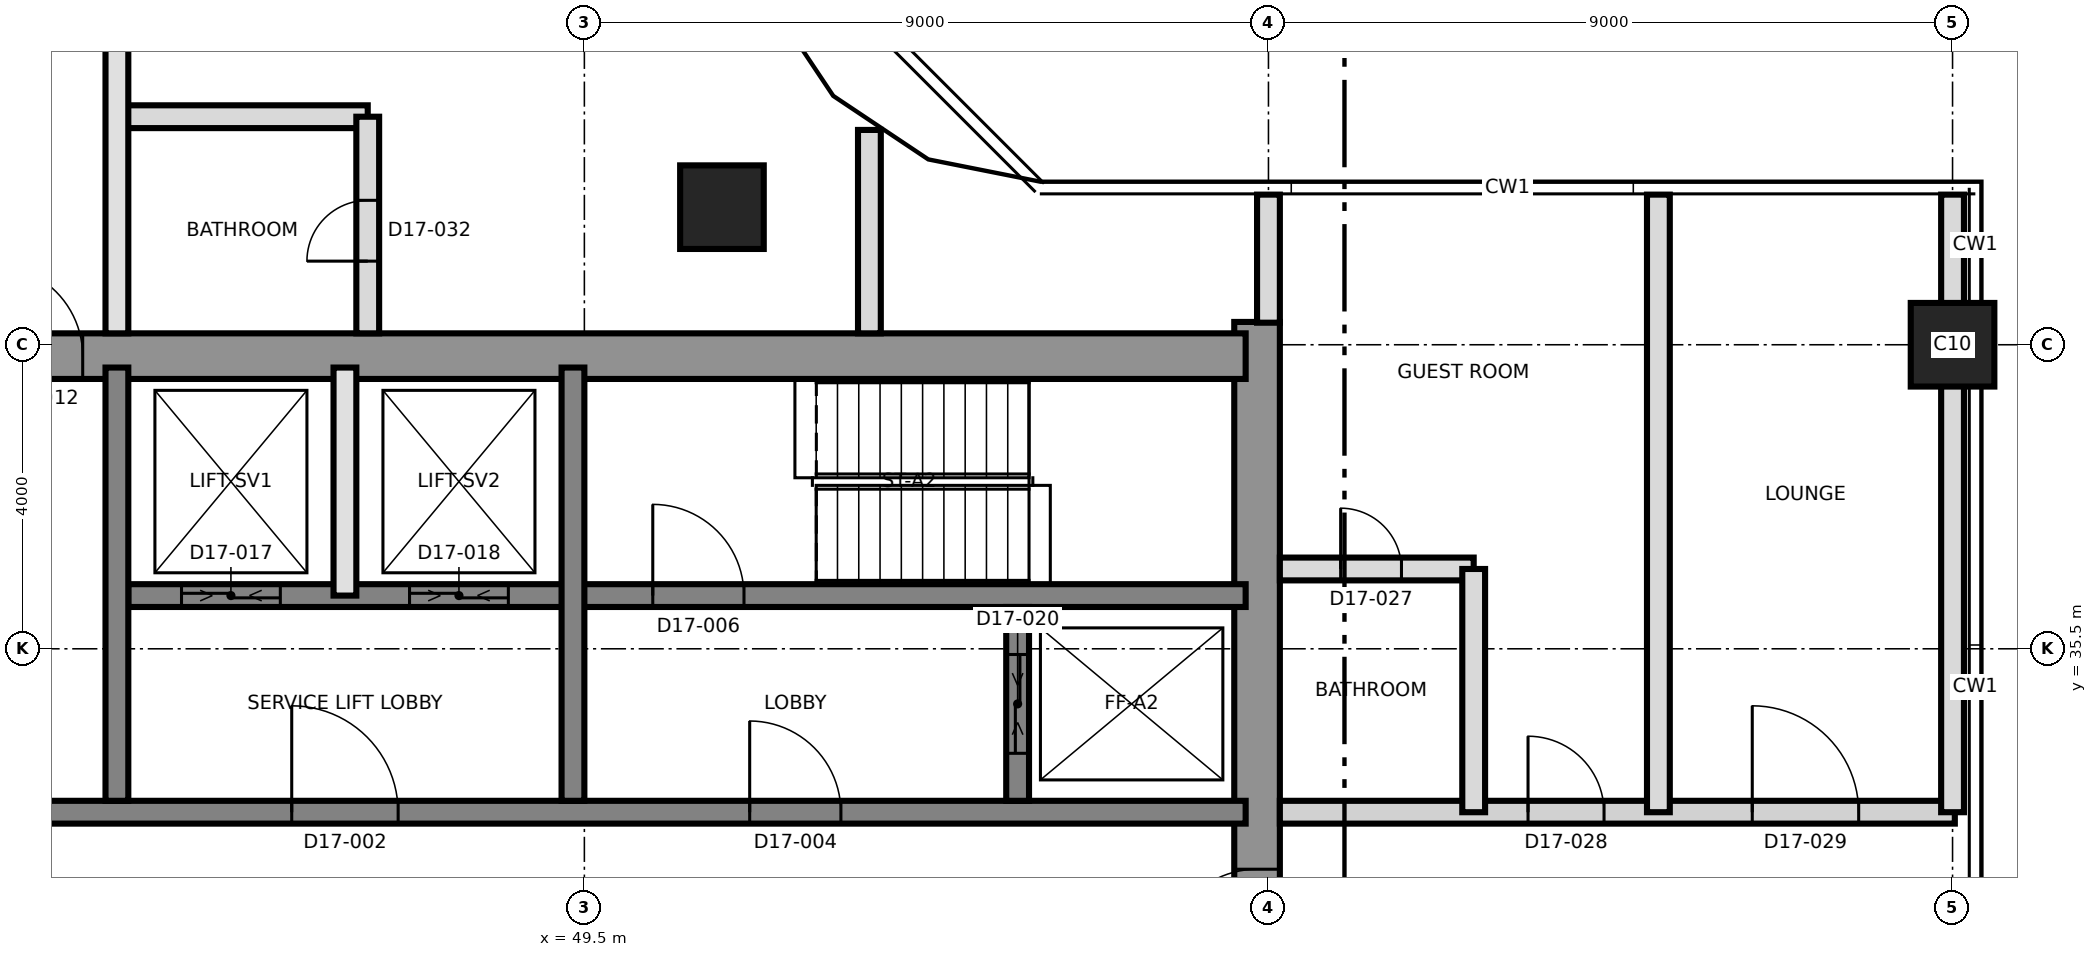
"""IFC4 building model, lengths in metres.
Left out: names, types, materials, properties, quantities, classifications, styles, units other than length and angle.
Written with IfcOpenShell. Run it as: python <this file> out.ifc"""

import sys

from ifc_helpers import new_model, si_unit, direction, frame, frame_2d, origin, origin_2d, place, context, subcontext, project, spatial, rectangle, extrude, element, fill, save


model = new_model("IFC4")
c1 = context("Model", 3, precision=1e-05, world=origin(), true_north=direction((0.0, 1.0)))
c2 = subcontext(c1, "Body", "Model", "MODEL_VIEW")
j1 = project(units=[si_unit("LENGTHUNIT", "METRE"), si_unit("PLANEANGLEUNIT", "RADIAN")], contexts=[c1])
p1 = place(None, origin())
s1 = spatial("IfcSite", under=j1, at=p1, CompositionType="ELEMENT")
p2 = place(p1, origin())
s2 = spatial("IfcBuilding", under=s1, at=p2, CompositionType="ELEMENT")
p3 = place(p2, frame((0.0, 0.0, 171.8)))
s3 = spatial("IfcBuildingStorey", under=s2, at=p3, CompositionType="ELEMENT", Elevation=171.8)
p4 = place(p3, frame((58.35, 21.2, 0.0), z_axis=(0.0, 0.0, 1.0), x_axis=(0.0, 1.0, 0.0)))
e1 = element("IfcWall", 1, at=p4, inside=s3, PredefinedType="SHEAR", context=c2, shape_type="SweptSolid", body=[
    extrude(rectangle(XDim=18.6, YDim=0.6, at=frame_2d((9.3, 0.0))), origin(), (0.0, 0.0, 1.0), 3.7),
])
p5 = place(p4, frame((10.2, 0.0, 0.0)))
e2 = element("IfcOpeningElement", 2, at=p5, cuts=e1, PredefinedType="OPENING", context=c2, shape_type="SweptSolid", body=[
    extrude(rectangle(XDim=1.2, YDim=2.1, at=frame_2d((0.6, 1.05))), frame((0.0, 0.31, 0.0), z_axis=(0.0, -1.0, 0.0), x_axis=(1.0, 0.0, 0.0)), (0.0, 0.0, 1.0), 0.62),
])
p6 = place(p3, frame((31.2, 39.35, 0.0), z_axis=(0.0, 0.0, 1.0), x_axis=(1.0, 0.0, 0.0)))
e3 = element("IfcWall", 3, at=p6, inside=s3, PredefinedType="SHEAR", context=c2, shape_type="SweptSolid", body=[
    extrude(rectangle(XDim=27.0, YDim=0.6, at=frame_2d((13.5, 0.0))), origin(), (0.0, 0.0, 1.0), 3.7),
])
p7 = place(p6, frame((10.5, 0.0, 0.0)))
e4 = element("IfcOpeningElement", 4, at=p7, cuts=e3, PredefinedType="OPENING", context=c2, shape_type="SweptSolid", body=[
    extrude(rectangle(XDim=1.2, YDim=2.1, at=frame_2d((0.6, 1.05))), frame((0.0, 0.31, 0.0), z_axis=(0.0, -1.0, 0.0), x_axis=(1.0, 0.0, 0.0)), (0.0, 0.0, 1.0), 0.62),
])
p8 = place(p3, frame((31.8, 33.35, 0.0), z_axis=(0.0, 0.0, 1.0), x_axis=(1.0, 0.0, 0.0)))
e5 = element("IfcWall", 5, at=p8, inside=s3, PredefinedType="SHEAR", context=c2, shape_type="SweptSolid", body=[
    extrude(rectangle(XDim=26.4, YDim=0.3, at=frame_2d((13.2, 0.0))), origin(), (0.0, 0.0, 1.0), 3.7),
])
p9 = place(p8, frame((13.85, 0.0, 0.0)))
e6 = element("IfcOpeningElement", 6, at=p9, cuts=e5, PredefinedType="OPENING", context=c2, shape_type="SweptSolid", body=[
    extrude(rectangle(XDim=1.4, YDim=2.1, at=frame_2d((0.7, 1.05))), frame((0.0, 0.16, 0.0), z_axis=(0.0, -1.0, 0.0), x_axis=(1.0, 0.0, 0.0)), (0.0, 0.0, 1.0), 0.32),
])
p10 = place(p8, frame((5.325, 0.0, 0.0)))
e7 = element("IfcOpeningElement", 7, at=p10, cuts=e5, PredefinedType="OPENING", context=c2, shape_type="SweptSolid", body=[
    extrude(rectangle(XDim=1.2, YDim=2.1, at=frame_2d((0.6, 1.05))), frame((0.0, 0.16, 0.0), z_axis=(0.0, -1.0, 0.0), x_axis=(1.0, 0.0, 0.0)), (0.0, 0.0, 1.0), 0.32),
])
p11 = place(p8, frame((19.875, 0.0, 0.0)))
e8 = element("IfcOpeningElement", 8, at=p11, cuts=e5, PredefinedType="OPENING", context=c2, shape_type="SweptSolid", body=[
    extrude(rectangle(XDim=1.2, YDim=2.1, at=frame_2d((0.6, 1.05))), frame((0.0, 0.16, 0.0), z_axis=(0.0, -1.0, 0.0), x_axis=(1.0, 0.0, 0.0)), (0.0, 0.0, 1.0), 0.32),
])
p12 = place(p3, frame((43.5, 36.2, 0.0), z_axis=(0.0, 0.0, 1.0), x_axis=(1.0, 0.0, 0.0)))
e9 = element("IfcWall", 9, at=p12, inside=s3, PredefinedType="SHEAR", context=c2, shape_type="SweptSolid", body=[
    extrude(rectangle(XDim=14.7, YDim=0.3, at=frame_2d((7.35, 0.0))), origin(), (0.0, 0.0, 1.0), 3.7),
])
p13 = place(p12, frame((6.9, 0.0, 0.0)))
e10 = element("IfcOpeningElement", 10, at=p13, cuts=e9, PredefinedType="OPENING", context=c2, shape_type="SweptSolid", body=[
    extrude(rectangle(XDim=1.2, YDim=2.1, at=frame_2d((0.6, 1.05))), frame((0.0, 0.16, 0.0), z_axis=(0.0, -1.0, 0.0), x_axis=(1.0, 0.0, 0.0)), (0.0, 0.0, 1.0), 0.32),
])
p14 = place(p12, frame((0.7, 0.0, 0.0)))
e11 = element("IfcOpeningElement", 11, at=p14, cuts=e9, PredefinedType="OPENING", context=c2, shape_type="SweptSolid", body=[
    extrude(rectangle(XDim=1.3, YDim=2.4, at=frame_2d((0.65, 1.2))), frame((0.0, 0.16, 0.0), z_axis=(0.0, -1.0, 0.0), x_axis=(1.0, 0.0, 0.0)), (0.0, 0.0, 1.0), 0.32),
])
p15 = place(p12, frame((3.7, 0.0, 0.0)))
e12 = element("IfcOpeningElement", 12, at=p15, cuts=e9, PredefinedType="OPENING", context=c2, shape_type="SweptSolid", body=[
    extrude(rectangle(XDim=1.3, YDim=2.4, at=frame_2d((0.65, 1.2))), frame((0.0, 0.16, 0.0), z_axis=(0.0, -1.0, 0.0), x_axis=(1.0, 0.0, 0.0)), (0.0, 0.0, 1.0), 0.32),
])
for number, where, z_axis, x_axis in (
    (13, (43.35, 33.5, 0.0), (0.0, 0.0, 1.0), (0.0, 1.0, 0.0)),
    (14, (49.35, 33.5, 0.0), (0.0, 0.0, 1.0), (0.0, 1.0, 0.0)),
):
    element("IfcWall", number, at=place(p3, frame(where, z_axis=z_axis, x_axis=x_axis)), inside=s3, PredefinedType="SHEAR", context=c2, shape_type="SweptSolid", body=[
        extrude(rectangle(XDim=5.7, YDim=0.3, at=frame_2d((2.85, 0.0))), origin(), (0.0, 0.0, 1.0), 3.7),
    ])
p16 = place(p3, frame((55.2, 33.5, 0.0), z_axis=(0.0, 0.0, 1.0), x_axis=(0.0, 1.0, 0.0)))
e15 = element("IfcWall", 15, at=p16, inside=s3, PredefinedType="SHEAR", context=c2, shape_type="SweptSolid", body=[
    extrude(rectangle(XDim=2.55, YDim=0.3, at=frame_2d((1.275, 0.0))), origin(), (0.0, 0.0, 1.0), 3.7),
])
p17 = place(p16, frame((0.625, 0.0, 0.0)))
e16 = element("IfcOpeningElement", 16, at=p17, cuts=e15, PredefinedType="OPENING", context=c2, shape_type="SweptSolid", body=[
    extrude(rectangle(XDim=1.3, YDim=2.4, at=frame_2d((0.65, 1.2))), frame((0.0, 0.16, 0.0), z_axis=(0.0, -1.0, 0.0), x_axis=(1.0, 0.0, 0.0)), (0.0, 0.0, 1.0), 0.32),
])
for number, where, z_axis, x_axis in (
    (17, (67.5, 39.5, 0.0), (0.0, 0.0, 1.0), (1.0, 0.0, 0.0)),
    (18, (51.31, 41.31, 0.0), (0.0, 0.0, 1.0), (1.0, 0.0, 0.0)),
):
    element("IfcColumn", number, at=place(p3, frame(where, z_axis=z_axis, x_axis=x_axis)), inside=s3, PredefinedType="COLUMN", context=c2, shape_type="SweptSolid", body=[
        extrude(rectangle(XDim=1.1, YDim=1.1, at=origin_2d()), origin(), (0.0, 0.0, 1.0), 3.7),
    ])
p18 = place(p3, frame((46.35, 36.2, 0.0), z_axis=(0.0, 0.0, 1.0), x_axis=(0.0, 1.0, 0.0)))
e19 = element("IfcWall", 19, at=p18, inside=s3, PredefinedType="SOLIDWALL", context=c2, shape_type="SweptSolid", body=[
    extrude(rectangle(XDim=3.0, YDim=0.3, at=frame_2d((1.5, 0.0))), origin(), (0.0, 0.0, 1.0), 3.4),
])
p19 = place(p3, frame((58.65, 33.35, 0.0), z_axis=(0.0, 0.0, 1.0), x_axis=(1.0, 0.0, 0.0)))
e20 = element("IfcWall", 20, at=p19, inside=s3, PredefinedType="PARTITIONING", context=c2, shape_type="SweptSolid", body=[
    extrude(rectangle(XDim=8.88, YDim=0.3, at=frame_2d((4.44, 0.0))), origin(), (0.0, 0.0, 1.0), 3.4),
])
p20 = place(p19, frame((3.265, 0.0, 0.0)))
e21 = element("IfcOpeningElement", 21, at=p20, cuts=e20, PredefinedType="OPENING", context=c2, shape_type="SweptSolid", body=[
    extrude(rectangle(XDim=1.0, YDim=2.1, at=frame_2d((0.5, 1.05))), frame((0.0, 0.16, 0.0), z_axis=(0.0, -1.0, 0.0), x_axis=(1.0, 0.0, 0.0)), (0.0, 0.0, 1.0), 0.32),
])
p21 = place(p19, frame((6.215, 0.0, 0.0)))
e22 = element("IfcOpeningElement", 22, at=p21, cuts=e20, PredefinedType="OPENING", context=c2, shape_type="SweptSolid", body=[
    extrude(rectangle(XDim=1.4, YDim=2.1, at=frame_2d((0.7, 1.05))), frame((0.0, 0.16, 0.0), z_axis=(0.0, -1.0, 0.0), x_axis=(1.0, 0.0, 0.0)), (0.0, 0.0, 1.0), 0.32),
])
p22 = place(p3, frame((58.65, 36.55, 0.0), z_axis=(0.0, 0.0, 1.0), x_axis=(1.0, 0.0, 0.0)))
e23 = element("IfcWall", 23, at=p22, inside=s3, PredefinedType="PARTITIONING", context=c2, shape_type="SweptSolid", body=[
    extrude(rectangle(XDim=2.55, YDim=0.3, at=frame_2d((1.275, 0.0))), origin(), (0.0, 0.0, 1.0), 3.4),
])
p23 = place(p22, frame((0.8, 0.0, 0.0)))
e24 = element("IfcOpeningElement", 24, at=p23, cuts=e23, PredefinedType="OPENING", context=c2, shape_type="SweptSolid", body=[
    extrude(rectangle(XDim=0.8, YDim=2.1, at=frame_2d((0.4, 1.05))), frame((0.0, 0.16, 0.0), z_axis=(0.0, -1.0, 0.0), x_axis=(1.0, 0.0, 0.0)), (0.0, 0.0, 1.0), 0.32),
])
p24 = place(p3, frame((43.35, 42.5, 0.0), z_axis=(0.0, 0.0, 1.0), x_axis=(1.0, 0.0, 0.0)))
e25 = element("IfcWall", 25, at=p24, inside=s3, PredefinedType="PARTITIONING", context=c2, shape_type="SweptSolid", body=[
    extrude(rectangle(XDim=3.3, YDim=0.3, at=frame_2d((1.65, 0.0))), origin(), (0.0, 0.0, 1.0), 3.4),
])
p25 = place(p3, frame((43.35, 39.65, 0.0), z_axis=(0.0, 0.0, 1.0), x_axis=(0.0, 1.0, 0.0)))
e26 = element("IfcWall", 26, at=p25, inside=s3, PredefinedType="SOLIDWALL", context=c2, shape_type="SweptSolid", body=[
    extrude(rectangle(XDim=26.15, YDim=0.3, at=frame_2d((13.075, 0.0))), origin(), (0.0, 0.0, 1.0), 3.4),
])
p26 = place(p25, frame((3.85, 0.0, 0.0)))
e27 = element("IfcOpeningElement", 27, at=p26, cuts=e26, PredefinedType="OPENING", context=c2, shape_type="SweptSolid", body=[
    extrude(rectangle(XDim=1.0, YDim=2.4, at=frame_2d((0.5, 1.2))), frame((0.0, 0.16, 0.0), z_axis=(0.0, -1.0, 0.0), x_axis=(1.0, 0.0, 0.0)), (0.0, 0.0, 1.0), 0.32),
])
p27 = place(p25, frame((12.265, 0.0, 0.0)))
e28 = element("IfcOpeningElement", 28, at=p27, cuts=e26, PredefinedType="OPENING", context=c2, shape_type="SweptSolid", body=[
    extrude(rectangle(XDim=1.0, YDim=2.1, at=frame_2d((0.5, 1.05))), frame((0.0, 0.16, 0.0), z_axis=(0.0, -1.0, 0.0), x_axis=(1.0, 0.0, 0.0)), (0.0, 0.0, 1.0), 0.32),
])
p28 = place(p25, frame((15.215, 0.0, 0.0)))
e29 = element("IfcOpeningElement", 29, at=p28, cuts=e26, PredefinedType="OPENING", context=c2, shape_type="SweptSolid", body=[
    extrude(rectangle(XDim=1.4, YDim=2.1, at=frame_2d((0.7, 1.05))), frame((0.0, 0.16, 0.0), z_axis=(0.0, -1.0, 0.0), x_axis=(1.0, 0.0, 0.0)), (0.0, 0.0, 1.0), 0.32),
])
p29 = place(p25, frame((21.4, 0.0, 0.0)))
e30 = element("IfcOpeningElement", 30, at=p29, cuts=e26, PredefinedType="OPENING", context=c2, shape_type="SweptSolid", body=[
    extrude(rectangle(XDim=1.0, YDim=2.4, at=frame_2d((0.5, 1.2))), frame((0.0, 0.16, 0.0), z_axis=(0.0, -1.0, 0.0), x_axis=(1.0, 0.0, 0.0)), (0.0, 0.0, 1.0), 0.32),
])
p30 = place(p3, frame((46.65, 39.65, 0.0), z_axis=(0.0, 0.0, 1.0), x_axis=(0.0, 1.0, 0.0)))
e31 = element("IfcWall", 31, at=p30, inside=s3, PredefinedType="PARTITIONING", context=c2, shape_type="SweptSolid", body=[
    extrude(rectangle(XDim=2.85, YDim=0.3, at=frame_2d((1.425, 0.0))), origin(), (0.0, 0.0, 1.0), 3.4),
])
p31 = place(p30, frame((0.95, 0.0, 0.0)))
e32 = element("IfcOpeningElement", 32, at=p31, cuts=e31, PredefinedType="OPENING", context=c2, shape_type="SweptSolid", body=[
    extrude(rectangle(XDim=0.8, YDim=2.1, at=frame_2d((0.4, 1.05))), frame((0.0, 0.16, 0.0), z_axis=(0.0, -1.0, 0.0), x_axis=(1.0, 0.0, 0.0)), (0.0, 0.0, 1.0), 0.32),
])
p32 = place(p3, frame((53.25, 39.65, 0.0), z_axis=(0.0, 0.0, 1.0), x_axis=(0.0, 1.0, 0.0)))
e33 = element("IfcWall", 33, at=p32, inside=s3, PredefinedType="PARTITIONING", context=c2, shape_type="SweptSolid", body=[
    extrude(rectangle(XDim=2.676, YDim=0.3, at=frame_2d((1.338, 0.0))), origin(), (0.0, 0.0, 1.0), 3.4),
])
p33 = place(p3, frame((58.5, 39.79, 0.0), z_axis=(0.0, 0.0, 1.0), x_axis=(0.0, 1.0, 0.0)))
e34 = element("IfcWall", 34, at=p33, inside=s3, PredefinedType="PARTITIONING", context=c2, shape_type="SweptSolid", body=[
    extrude(rectangle(XDim=1.685, YDim=0.3, at=frame_2d((0.843, 0.0))), origin(), (0.0, 0.0, 1.0), 3.4),
])
p34 = place(p3, frame((61.2, 33.35, 0.0), z_axis=(0.0, 0.0, 1.0), x_axis=(0.0, 1.0, 0.0)))
e35 = element("IfcWall", 35, at=p34, inside=s3, PredefinedType="PARTITIONING", context=c2, shape_type="SweptSolid", body=[
    extrude(rectangle(XDim=3.2, YDim=0.3, at=frame_2d((1.6, 0.0))), origin(), (0.0, 0.0, 1.0), 3.4),
])
for number, where, z_axis, x_axis in (
    (36, (63.63, 33.35, 0.0), (0.0, 0.0, 1.0), (0.0, 1.0, 0.0)),
    (37, (67.5, 33.35, 0.0), (0.0, 0.0, 1.0), (0.0, 1.0, 0.0)),
):
    element("IfcWall", number, at=place(p3, frame(where, z_axis=z_axis, x_axis=x_axis)), inside=s3, PredefinedType="PARTITIONING", context=c2, shape_type="SweptSolid", body=[
        extrude(rectangle(XDim=8.125, YDim=0.3, at=frame_2d((4.062, 0.0))), origin(), (0.0, 0.0, 1.0), 3.4),
    ])
p35 = place(p9, origin())
e38 = element("IfcDoor", 38, at=p35, inside=s3, OperationType="SINGLE_SWING_RIGHT", PredefinedType="DOOR", context=c2, shape_type="SweptSolid", body=[
    extrude(rectangle(XDim=1.4, YDim=2.1, at=frame_2d((0.7, 1.05))), frame((0.0, 0.025, 0.0), z_axis=(0.0, -1.0, 0.0), x_axis=(1.0, 0.0, 0.0)), (0.0, 0.0, 1.0), 0.05),
])
fill(e6, e38)
p36 = place(p11, origin())
e39 = element("IfcDoor", 39, at=p36, inside=s3, OperationType="SINGLE_SWING_RIGHT", PredefinedType="DOOR", context=c2, shape_type="SweptSolid", body=[
    extrude(rectangle(XDim=1.2, YDim=2.1, at=frame_2d((0.6, 1.05))), frame((0.0, 0.025, 0.0), z_axis=(0.0, -1.0, 0.0), x_axis=(1.0, 0.0, 0.0)), (0.0, 0.0, 1.0), 0.05),
])
fill(e8, e39)
p37 = place(p13, origin())
e40 = element("IfcDoor", 40, at=p37, inside=s3, OperationType="SINGLE_SWING_LEFT", PredefinedType="DOOR", context=c2, shape_type="SweptSolid", body=[
    extrude(rectangle(XDim=1.2, YDim=2.1, at=frame_2d((0.6, 1.05))), frame((0.0, 0.025, 0.0), z_axis=(0.0, -1.0, 0.0), x_axis=(1.0, 0.0, 0.0)), (0.0, 0.0, 1.0), 0.05),
])
fill(e10, e40)
p38 = place(p5, origin())
e41 = element("IfcDoor", 41, at=p38, inside=s3, OperationType="SINGLE_SWING_LEFT", PredefinedType="DOOR", context=c2, shape_type="SweptSolid", body=[
    extrude(rectangle(XDim=1.2, YDim=2.1, at=frame_2d((0.6, 1.05))), frame((0.0, 0.025, 0.0), z_axis=(0.0, -1.0, 0.0), x_axis=(1.0, 0.0, 0.0)), (0.0, 0.0, 1.0), 0.05),
])
fill(e2, e41)
p39 = place(p7, origin())
e42 = element("IfcDoor", 42, at=p39, inside=s3, OperationType="SINGLE_SWING_RIGHT", PredefinedType="DOOR", context=c2, shape_type="SweptSolid", body=[
    extrude(rectangle(XDim=1.2, YDim=2.1, at=frame_2d((0.6, 1.05))), frame((0.0, 0.025, 0.0), z_axis=(0.0, -1.0, 0.0), x_axis=(1.0, 0.0, 0.0)), (0.0, 0.0, 1.0), 0.05),
])
fill(e4, e42)
p40 = place(p14, origin())
e43 = element("IfcDoor", 43, at=p40, inside=s3, OperationType="SLIDING_TO_LEFT", PredefinedType="DOOR", context=c2, shape_type="SweptSolid", body=[
    extrude(rectangle(XDim=1.3, YDim=2.4, at=frame_2d((0.65, 1.2))), frame((0.0, 0.025, 0.0), z_axis=(0.0, -1.0, 0.0), x_axis=(1.0, 0.0, 0.0)), (0.0, 0.0, 1.0), 0.05),
])
fill(e11, e43)
p41 = place(p15, origin())
e44 = element("IfcDoor", 44, at=p41, inside=s3, OperationType="SLIDING_TO_LEFT", PredefinedType="DOOR", context=c2, shape_type="SweptSolid", body=[
    extrude(rectangle(XDim=1.3, YDim=2.4, at=frame_2d((0.65, 1.2))), frame((0.0, 0.025, 0.0), z_axis=(0.0, -1.0, 0.0), x_axis=(1.0, 0.0, 0.0)), (0.0, 0.0, 1.0), 0.05),
])
fill(e12, e44)
p42 = place(p17, origin())
e45 = element("IfcDoor", 45, at=p42, inside=s3, OperationType="SLIDING_TO_LEFT", PredefinedType="DOOR", context=c2, shape_type="SweptSolid", body=[
    extrude(rectangle(XDim=1.3, YDim=2.4, at=frame_2d((0.65, 1.2))), frame((0.0, 0.025, 0.0), z_axis=(0.0, -1.0, 0.0), x_axis=(1.0, 0.0, 0.0)), (0.0, 0.0, 1.0), 0.05),
])
fill(e16, e45)
p43 = place(p23, origin())
e46 = element("IfcDoor", 46, at=p43, inside=s3, OperationType="SINGLE_SWING_LEFT", PredefinedType="DOOR", context=c2, shape_type="SweptSolid", body=[
    extrude(rectangle(XDim=0.8, YDim=2.1, at=frame_2d((0.4, 1.05))), frame((0.0, 0.025, 0.0), z_axis=(0.0, -1.0, 0.0), x_axis=(1.0, 0.0, 0.0)), (0.0, 0.0, 1.0), 0.05),
])
fill(e24, e46)
p44 = place(p20, origin())
e47 = element("IfcDoor", 47, at=p44, inside=s3, OperationType="SINGLE_SWING_LEFT", PredefinedType="DOOR", context=c2, shape_type="SweptSolid", body=[
    extrude(rectangle(XDim=1.0, YDim=2.1, at=frame_2d((0.5, 1.05))), frame((0.0, 0.025, 0.0), z_axis=(0.0, -1.0, 0.0), x_axis=(1.0, 0.0, 0.0)), (0.0, 0.0, 1.0), 0.05),
])
fill(e21, e47)
p45 = place(p21, origin())
e48 = element("IfcDoor", 48, at=p45, inside=s3, OperationType="SINGLE_SWING_RIGHT", PredefinedType="DOOR", context=c2, shape_type="SweptSolid", body=[
    extrude(rectangle(XDim=1.4, YDim=2.1, at=frame_2d((0.7, 1.05))), frame((0.0, 0.025, 0.0), z_axis=(0.0, -1.0, 0.0), x_axis=(1.0, 0.0, 0.0)), (0.0, 0.0, 1.0), 0.05),
])
fill(e22, e48)
p46 = place(p31, origin())
e49 = element("IfcDoor", 49, at=p46, inside=s3, OperationType="SINGLE_SWING_LEFT", PredefinedType="DOOR", context=c2, shape_type="SweptSolid", body=[
    extrude(rectangle(XDim=0.8, YDim=2.1, at=frame_2d((0.4, 1.05))), frame((0.0, 0.025, 0.0), z_axis=(0.0, -1.0, 0.0), x_axis=(1.0, 0.0, 0.0)), (0.0, 0.0, 1.0), 0.05),
])
fill(e32, e49)
save(model, sys.argv[1])
